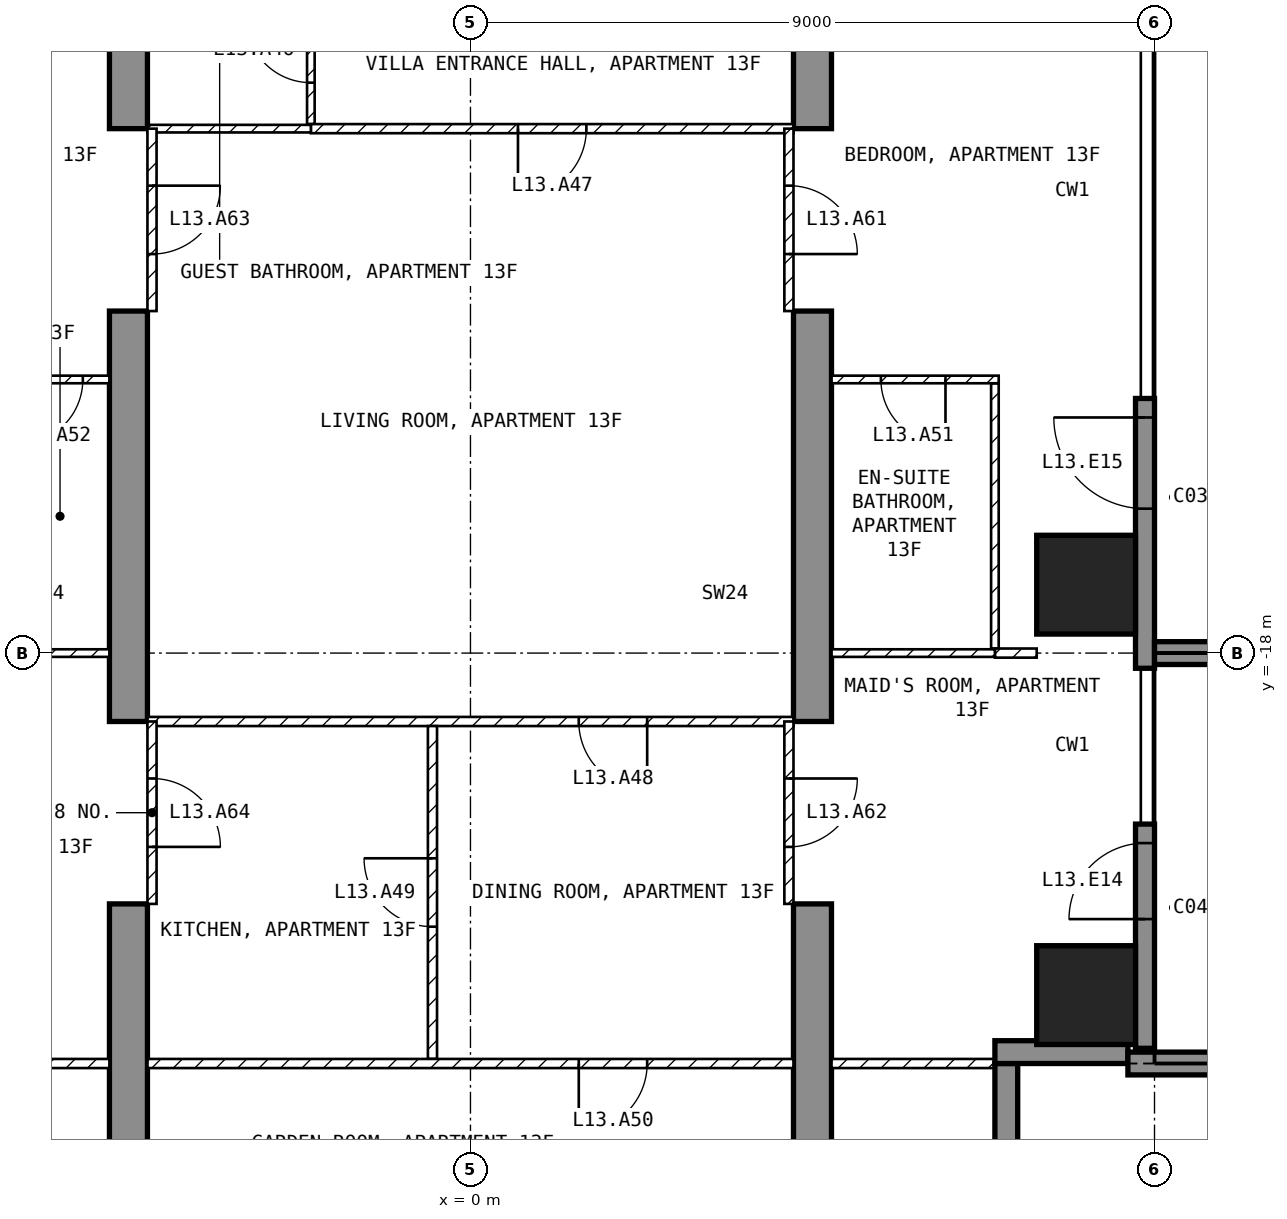
"""IFC4 building model, lengths in metres.
Left out: names, types, materials, properties, quantities, classifications, styles, units other than length and angle.
Written with IfcOpenShell. Run it as: python <this file> out.ifc"""

import sys

from ifc_helpers import new_model, si_unit, direction, frame, frame_2d, origin, origin_2d, place, context, subcontext, project, spatial, polyline, rectangle, outline, extrude, element, fill, save


model = new_model("IFC4")
c1 = context("Model", 3, precision=1e-05, world=origin(), true_north=direction((0.0, 1.0)))
c2 = subcontext(c1, "Body", "Model", "MODEL_VIEW")
j1 = project(units=[si_unit("LENGTHUNIT", "METRE"), si_unit("PLANEANGLEUNIT", "RADIAN")], contexts=[c1])
p1 = place(None, origin())
s1 = spatial("IfcSite", under=j1, at=p1, CompositionType="ELEMENT")
p2 = place(p1, origin())
s2 = spatial("IfcBuilding", under=s1, at=p2, CompositionType="ELEMENT")
p3 = place(p2, frame((0.0, 0.0, 64.5)))
s3 = spatial("IfcBuildingStorey", under=s2, at=p3, CompositionType="ELEMENT", Elevation=64.5)
for number, where, z_axis, x_axis in (
    (1, (8.1, -22.5, -0.25), (0.0, 0.0, 1.0), (1.0, 0.0, 0.0)),
    (2, (8.1, -17.1, -0.25), (0.0, 0.0, 1.0), (1.0, 0.0, 0.0)),
):
    element("IfcColumn", number, at=place(p3, frame(where, z_axis=z_axis, x_axis=x_axis)), inside=s3, PredefinedType="COLUMN", context=c2, shape_type="SweptSolid", body=[
        extrude(rectangle(XDim=1.3, YDim=1.3, at=origin_2d()), origin(), (0.0, 0.0, 1.0), 3.5),
    ])
for number, where, z_axis, x_axis in (
    (3, (-4.75, -25.45, -0.25), (1.0, 0.0, 0.0), (0.0, 1.0, 0.0)),
    (4, (4.25, -25.45, -0.25), (1.0, 0.0, 0.0), (0.0, 1.0, 0.0)),
):
    element("IfcWall", number, at=place(p3, frame(where, z_axis=z_axis, x_axis=x_axis)), inside=s3, PredefinedType="SHEAR", context=c2, shape_type="SweptSolid", body=[
        extrude(outline(polyline([(0.0, 0.0), (4.15, 0.0), (4.15, 2.65), (6.55, 2.65), (6.55, 0.0), (11.95, 0.0), (11.95, 2.65), (14.35, 2.65), (14.35, 0.0), (16.45, 0.0), (16.45, 3.5), (0.0, 3.5), (0.0, 0.0)])), origin(), (0.0, 0.0, 1.0), 0.5),
    ])
p4 = place(p3, frame((8.875, -23.2, 0.0), z_axis=(0.0, 0.0, 1.0), x_axis=(0.0, 1.0, 0.0)))
e5 = element("IfcWall", 5, at=p4, inside=s3, PredefinedType="SOLIDWALL", context=c2, shape_type="SweptSolid", body=[
    extrude(rectangle(XDim=2.95, YDim=0.25, at=frame_2d((1.475, 0.0))), origin(), (0.0, 0.0, 1.0), 3.25),
])
p5 = place(p4, frame((1.7, 0.0, 0.0)))
e6 = element("IfcOpeningElement", 6, at=p5, cuts=e5, PredefinedType="OPENING", context=c2, shape_type="SweptSolid", body=[
    extrude(rectangle(XDim=1.0, YDim=2.4, at=frame_2d((0.5, 1.2))), frame((0.0, 0.135, 0.0), z_axis=(0.0, -1.0, 0.0), x_axis=(1.0, 0.0, 0.0)), (0.0, 0.0, 1.0), 0.27),
])
p6 = place(p3, frame((8.875, -18.2, 0.0), z_axis=(0.0, 0.0, 1.0), x_axis=(0.0, 1.0, 0.0)))
e7 = element("IfcWall", 7, at=p6, inside=s3, PredefinedType="SOLIDWALL", context=c2, shape_type="SweptSolid", body=[
    extrude(rectangle(XDim=3.55, YDim=0.25, at=frame_2d((1.775, 0.0))), origin(), (0.0, 0.0, 1.0), 3.25),
])
p7 = place(p6, frame((2.1, 0.0, 0.0)))
e8 = element("IfcOpeningElement", 8, at=p7, cuts=e7, PredefinedType="OPENING", context=c2, shape_type="SweptSolid", body=[
    extrude(rectangle(XDim=1.2, YDim=2.4, at=frame_2d((0.6, 1.2))), frame((0.0, 0.135, 0.0), z_axis=(0.0, -1.0, 0.0), x_axis=(1.0, 0.0, 0.0)), (0.0, 0.0, 1.0), 0.27),
])
p8 = place(p3, frame((7.05, -25.2, 0.0), z_axis=(0.0, 0.0, 1.0), x_axis=(0.0, 1.0, 0.0)))
e9 = element("IfcWall", 9, at=p8, inside=s3, PredefinedType="SOLIDWALL", context=c2, shape_type="SweptSolid", body=[
    extrude(rectangle(XDim=1.8, YDim=0.3, at=frame_2d((0.9, 0.0))), origin(), (0.0, 0.0, 1.0), 3.25),
])
p9 = place(p3, frame((6.9, -23.25, 0.0), z_axis=(0.0, 0.0, 1.0), x_axis=(1.0, 0.0, 0.0)))
e10 = element("IfcWall", 10, at=p9, inside=s3, PredefinedType="SOLIDWALL", context=c2, shape_type="SweptSolid", body=[
    extrude(rectangle(XDim=1.75, YDim=0.3, at=frame_2d((0.875, 0.0))), origin(), (0.0, 0.0, 1.0), 3.25),
])
p10 = place(p3, frame((8.65, -23.4, 0.0), z_axis=(0.0, 0.0, 1.0), x_axis=(1.0, 0.0, 0.0)))
e11 = element("IfcWall", 11, at=p10, inside=s3, PredefinedType="SOLIDWALL", context=c2, shape_type="SweptSolid", body=[
    extrude(rectangle(XDim=3.05, YDim=0.3, at=frame_2d((1.525, 0.0))), origin(), (0.0, 0.0, 1.0), 3.25),
])
p11 = place(p3, frame((9.0, -18.0, 0.0), z_axis=(0.0, 0.0, 1.0), x_axis=(1.0, 0.0, 0.0)))
e12 = element("IfcWall", 12, at=p11, inside=s3, PredefinedType="SOLIDWALL", context=c2, shape_type="SweptSolid", body=[
    extrude(rectangle(XDim=2.7, YDim=0.3, at=frame_2d((1.35, 0.0))), origin(), (0.0, 0.0, 1.0), 3.25),
])
p12 = place(p3, frame((-2.1, -11.04, 0.0), z_axis=(0.0, 0.0, 1.0), x_axis=(0.0, 1.0, 0.0)))
e13 = element("IfcWall", 13, at=p12, inside=s3, PredefinedType="PARTITIONING", context=c2, shape_type="SweptSolid", body=[
    extrude(rectangle(XDim=1.94, YDim=0.1, at=frame_2d((0.97, 0.0))), origin(), (0.0, 0.0, 1.0), 3.25),
])
p13 = place(p12, frame((0.545, 0.0, 0.0)))
e14 = element("IfcOpeningElement", 14, at=p13, cuts=e13, PredefinedType="OPENING", context=c2, shape_type="SweptSolid", body=[
    extrude(rectangle(XDim=0.85, YDim=2.1, at=frame_2d((0.425, 1.05))), frame((0.0, 0.06, 0.0), z_axis=(0.0, -1.0, 0.0), x_axis=(1.0, 0.0, 0.0)), (0.0, 0.0, 1.0), 0.12),
])
p14 = place(p3, frame((4.25, -11.1, 0.0), z_axis=(0.0, 0.0, 1.0), x_axis=(-1.0, 0.0, 0.0)))
e15 = element("IfcWall", 15, at=p14, inside=s3, PredefinedType="PARTITIONING", context=c2, shape_type="SweptSolid", body=[
    extrude(rectangle(XDim=6.35, YDim=0.12, at=frame_2d((3.175, 0.0))), origin(), (0.0, 0.0, 1.0), 3.25),
])
p15 = place(p14, frame((2.725, 0.0, 0.0)))
e16 = element("IfcOpeningElement", 16, at=p15, cuts=e15, PredefinedType="OPENING", context=c2, shape_type="SweptSolid", body=[
    extrude(rectangle(XDim=0.9, YDim=2.1, at=frame_2d((0.45, 1.05))), frame((0.0, 0.07, 0.0), z_axis=(0.0, -1.0, 0.0), x_axis=(1.0, 0.0, 0.0)), (0.0, 0.0, 1.0), 0.14),
])
p16 = place(p3, frame((-2.1, -11.1, 0.0), z_axis=(0.0, 0.0, 1.0), x_axis=(-1.0, 0.0, 0.0)))
e17 = element("IfcWall", 17, at=p16, inside=s3, PredefinedType="PARTITIONING", context=c2, shape_type="SweptSolid", body=[
    extrude(rectangle(XDim=2.15, YDim=0.1, at=frame_2d((1.075, 0.0))), origin(), (0.0, 0.0, 1.0), 3.25),
])
p17 = place(p3, frame((4.25, -18.9, 0.0), z_axis=(0.0, 0.0, 1.0), x_axis=(-1.0, 0.0, 0.0)))
e18 = element("IfcWall", 18, at=p17, inside=s3, PredefinedType="PARTITIONING", context=c2, shape_type="SweptSolid", body=[
    extrude(rectangle(XDim=8.5, YDim=0.12, at=frame_2d((4.25, 0.0))), origin(), (0.0, 0.0, 1.0), 3.25),
])
p18 = place(p17, frame((1.925, 0.0, 0.0)))
e19 = element("IfcOpeningElement", 19, at=p18, cuts=e18, PredefinedType="OPENING", context=c2, shape_type="SweptSolid", body=[
    extrude(rectangle(XDim=0.9, YDim=2.1, at=frame_2d((0.45, 1.05))), frame((0.0, 0.07, 0.0), z_axis=(0.0, -1.0, 0.0), x_axis=(1.0, 0.0, 0.0)), (0.0, 0.0, 1.0), 0.14),
])
p19 = place(p3, frame((-0.5, -23.34, 0.0), z_axis=(0.0, 0.0, 1.0), x_axis=(0.0, 1.0, 0.0)))
e20 = element("IfcWall", 20, at=p19, inside=s3, PredefinedType="PARTITIONING", context=c2, shape_type="SweptSolid", body=[
    extrude(rectangle(XDim=4.38, YDim=0.12, at=frame_2d((2.19, 0.0))), origin(), (0.0, 0.0, 1.0), 3.25),
])
p20 = place(p19, frame((1.74, 0.0, 0.0)))
e21 = element("IfcOpeningElement", 21, at=p20, cuts=e20, PredefinedType="OPENING", context=c2, shape_type="SweptSolid", body=[
    extrude(rectangle(XDim=0.9, YDim=2.1, at=frame_2d((0.45, 1.05))), frame((0.0, 0.07, 0.0), z_axis=(0.0, -1.0, 0.0), x_axis=(1.0, 0.0, 0.0)), (0.0, 0.0, 1.0), 0.14),
])
p21 = place(p3, frame((4.25, -23.4, 0.0), z_axis=(0.0, 0.0, 1.0), x_axis=(-1.0, 0.0, 0.0)))
e22 = element("IfcWall", 22, at=p21, inside=s3, PredefinedType="PARTITIONING", context=c2, shape_type="SweptSolid", body=[
    extrude(rectangle(XDim=8.5, YDim=0.12, at=frame_2d((4.25, 0.0))), origin(), (0.0, 0.0, 1.0), 3.25),
])
p22 = place(p21, frame((1.925, 0.0, 0.0)))
e23 = element("IfcOpeningElement", 23, at=p22, cuts=e22, PredefinedType="OPENING", context=c2, shape_type="SweptSolid", body=[
    extrude(rectangle(XDim=0.9, YDim=2.1, at=frame_2d((0.45, 1.05))), frame((0.0, 0.07, 0.0), z_axis=(0.0, -1.0, 0.0), x_axis=(1.0, 0.0, 0.0)), (0.0, 0.0, 1.0), 0.14),
])
p23 = place(p3, frame((6.9, -17.94, 0.0), z_axis=(0.0, 0.0, 1.0), x_axis=(0.0, 1.0, 0.0)))
e24 = element("IfcWall", 24, at=p23, inside=s3, PredefinedType="PARTITIONING", context=c2, shape_type="SweptSolid", body=[
    extrude(rectangle(XDim=3.49, YDim=0.1, at=frame_2d((1.745, 0.0))), origin(), (0.0, 0.0, 1.0), 3.25),
])
p24 = place(p3, frame((6.95, -14.4, 0.0), z_axis=(0.0, 0.0, 1.0), x_axis=(-1.0, 0.0, 0.0)))
e25 = element("IfcWall", 25, at=p24, inside=s3, PredefinedType="PARTITIONING", context=c2, shape_type="SweptSolid", body=[
    extrude(rectangle(XDim=2.2, YDim=0.1, at=frame_2d((1.1, 0.0))), origin(), (0.0, 0.0, 1.0), 3.25),
])
p25 = place(p24, frame((0.7, 0.0, 0.0)))
e26 = element("IfcOpeningElement", 26, at=p25, cuts=e25, PredefinedType="OPENING", context=c2, shape_type="SweptSolid", body=[
    extrude(rectangle(XDim=0.85, YDim=2.1, at=frame_2d((0.425, 1.05))), frame((0.0, 0.06, 0.0), z_axis=(0.0, -1.0, 0.0), x_axis=(1.0, 0.0, 0.0)), (0.0, 0.0, 1.0), 0.12),
])
p26 = place(p3, frame((7.45, -18.0, 0.0), z_axis=(0.0, 0.0, 1.0), x_axis=(-1.0, 0.0, 0.0)))
e27 = element("IfcWall", 27, at=p26, inside=s3, PredefinedType="PARTITIONING", context=c2, shape_type="SweptSolid", body=[
    extrude(rectangle(XDim=0.55, YDim=0.12, at=frame_2d((0.275, 0.0))), origin(), (0.0, 0.0, 1.0), 3.25),
])
p27 = place(p3, frame((6.9, -18.0, 0.0), z_axis=(0.0, 0.0, 1.0), x_axis=(-1.0, 0.0, 0.0)))
e28 = element("IfcWall", 28, at=p27, inside=s3, PredefinedType="PARTITIONING", context=c2, shape_type="SweptSolid", body=[
    extrude(rectangle(XDim=2.15, YDim=0.1, at=frame_2d((1.075, 0.0))), origin(), (0.0, 0.0, 1.0), 3.25),
])
p28 = place(p3, frame((7.12, -23.4, 0.0), z_axis=(0.0, 0.0, 1.0), x_axis=(-1.0, 0.0, 0.0)))
e29 = element("IfcWall", 29, at=p28, inside=s3, PredefinedType="PARTITIONING", context=c2, shape_type="SweptSolid", body=[
    extrude(rectangle(XDim=2.37, YDim=0.12, at=frame_2d((1.185, 0.0))), origin(), (0.0, 0.0, 1.0), 3.25),
])
p29 = place(p3, frame((-4.75, -14.4, 0.0), z_axis=(0.0, 0.0, 1.0), x_axis=(-1.0, 0.0, 0.0)))
e30 = element("IfcWall", 30, at=p29, inside=s3, PredefinedType="PARTITIONING", context=c2, shape_type="SweptSolid", body=[
    extrude(rectangle(XDim=1.6, YDim=0.1, at=frame_2d((0.8, 0.0))), origin(), (0.0, 0.0, 1.0), 3.25),
])
p30 = place(p29, frame((0.35, 0.0, 0.0)))
e31 = element("IfcOpeningElement", 31, at=p30, cuts=e30, PredefinedType="OPENING", context=c2, shape_type="SweptSolid", body=[
    extrude(rectangle(XDim=0.85, YDim=2.1, at=frame_2d((0.425, 1.05))), frame((0.0, 0.06, 0.0), z_axis=(0.0, -1.0, 0.0), x_axis=(1.0, 0.0, 0.0)), (0.0, 0.0, 1.0), 0.12),
])
p31 = place(p3, frame((-4.75, -18.0, 0.0), z_axis=(0.0, 0.0, 1.0), x_axis=(-1.0, 0.0, 0.0)))
e32 = element("IfcWall", 32, at=p31, inside=s3, PredefinedType="PARTITIONING", context=c2, shape_type="SweptSolid", body=[
    extrude(rectangle(XDim=1.55, YDim=0.1, at=frame_2d((0.775, 0.0))), origin(), (0.0, 0.0, 1.0), 3.25),
])
p32 = place(p3, frame((-4.75, -23.4, 0.0), z_axis=(0.0, 0.0, 1.0), x_axis=(-1.0, 0.0, 0.0)))
e33 = element("IfcWall", 33, at=p32, inside=s3, PredefinedType="PARTITIONING", context=c2, shape_type="SweptSolid", body=[
    extrude(rectangle(XDim=2.37, YDim=0.12, at=frame_2d((1.185, 0.0))), origin(), (0.0, 0.0, 1.0), 3.25),
])
p33 = place(p3, frame((4.19, -11.1, 0.0), z_axis=(0.0, 0.0, 1.0), x_axis=(0.0, -1.0, 0.0)))
e34 = element("IfcWall", 34, at=p33, inside=s3, PredefinedType="PARTITIONING", context=c2, shape_type="SweptSolid", body=[
    extrude(rectangle(XDim=2.4, YDim=0.12, at=frame_2d((1.2, 0.0))), origin(), (0.0, 0.0, 1.0), 2.4),
])
p34 = place(p33, frame((0.75, 0.0, 0.0)))
e35 = element("IfcOpeningElement", 35, at=p34, cuts=e34, PredefinedType="OPENING", context=c2, shape_type="SweptSolid", body=[
    extrude(rectangle(XDim=0.9, YDim=2.1, at=frame_2d((0.45, 1.05))), frame((0.0, 0.07, 0.0), z_axis=(0.0, -1.0, 0.0), x_axis=(1.0, 0.0, 0.0)), (0.0, 0.0, 1.0), 0.14),
])
p35 = place(p3, frame((4.19, -18.9, 0.0), z_axis=(0.0, 0.0, 1.0), x_axis=(0.0, -1.0, 0.0)))
e36 = element("IfcWall", 36, at=p35, inside=s3, PredefinedType="PARTITIONING", context=c2, shape_type="SweptSolid", body=[
    extrude(rectangle(XDim=2.4, YDim=0.12, at=frame_2d((1.2, 0.0))), origin(), (0.0, 0.0, 1.0), 2.4),
])
p36 = place(p35, frame((0.75, 0.0, 0.0)))
e37 = element("IfcOpeningElement", 37, at=p36, cuts=e36, PredefinedType="OPENING", context=c2, shape_type="SweptSolid", body=[
    extrude(rectangle(XDim=0.9, YDim=2.1, at=frame_2d((0.45, 1.05))), frame((0.0, 0.07, 0.0), z_axis=(0.0, -1.0, 0.0), x_axis=(1.0, 0.0, 0.0)), (0.0, 0.0, 1.0), 0.14),
])
p37 = place(p3, frame((-4.19, -11.1, 0.0), z_axis=(0.0, 0.0, 1.0), x_axis=(0.0, -1.0, 0.0)))
e38 = element("IfcWall", 38, at=p37, inside=s3, PredefinedType="PARTITIONING", context=c2, shape_type="SweptSolid", body=[
    extrude(rectangle(XDim=2.4, YDim=0.12, at=frame_2d((1.2, 0.0))), origin(), (0.0, 0.0, 1.0), 2.4),
])
p38 = place(p37, frame((0.75, 0.0, 0.0)))
e39 = element("IfcOpeningElement", 39, at=p38, cuts=e38, PredefinedType="OPENING", context=c2, shape_type="SweptSolid", body=[
    extrude(rectangle(XDim=0.9, YDim=2.1, at=frame_2d((0.45, 1.05))), frame((0.0, 0.07, 0.0), z_axis=(0.0, -1.0, 0.0), x_axis=(1.0, 0.0, 0.0)), (0.0, 0.0, 1.0), 0.14),
])
p39 = place(p3, frame((-4.19, -18.9, 0.0), z_axis=(0.0, 0.0, 1.0), x_axis=(0.0, -1.0, 0.0)))
e40 = element("IfcWall", 40, at=p39, inside=s3, PredefinedType="PARTITIONING", context=c2, shape_type="SweptSolid", body=[
    extrude(rectangle(XDim=2.4, YDim=0.12, at=frame_2d((1.2, 0.0))), origin(), (0.0, 0.0, 1.0), 2.4),
])
p40 = place(p39, frame((0.75, 0.0, 0.0)))
e41 = element("IfcOpeningElement", 41, at=p40, cuts=e40, PredefinedType="OPENING", context=c2, shape_type="SweptSolid", body=[
    extrude(rectangle(XDim=0.9, YDim=2.1, at=frame_2d((0.45, 1.05))), frame((0.0, 0.07, 0.0), z_axis=(0.0, -1.0, 0.0), x_axis=(1.0, 0.0, 0.0)), (0.0, 0.0, 1.0), 0.14),
])
p41 = place(p5, origin())
e42 = element("IfcDoor", 42, at=p41, inside=s3, OperationType="SINGLE_SWING_LEFT", PredefinedType="DOOR", context=c2, shape_type="SweptSolid", body=[
    extrude(rectangle(XDim=1.0, YDim=2.4, at=frame_2d((0.5, 1.2))), frame((0.0, 0.025, 0.0), z_axis=(0.0, -1.0, 0.0), x_axis=(1.0, 0.0, 0.0)), (0.0, 0.0, 1.0), 0.05),
])
fill(e6, e42)
p42 = place(p7, origin())
e43 = element("IfcDoor", 43, at=p42, inside=s3, OperationType="SINGLE_SWING_RIGHT", PredefinedType="DOOR", context=c2, shape_type="SweptSolid", body=[
    extrude(rectangle(XDim=1.2, YDim=2.4, at=frame_2d((0.6, 1.2))), frame((0.0, 0.025, 0.0), z_axis=(0.0, -1.0, 0.0), x_axis=(1.0, 0.0, 0.0)), (0.0, 0.0, 1.0), 0.05),
])
fill(e8, e43)
p43 = place(p13, origin())
e44 = element("IfcDoor", 44, at=p43, inside=s3, OperationType="SINGLE_SWING_RIGHT", PredefinedType="DOOR", context=c2, shape_type="SweptSolid", body=[
    extrude(rectangle(XDim=0.85, YDim=2.1, at=frame_2d((0.425, 1.05))), frame((0.0, 0.025, 0.0), z_axis=(0.0, -1.0, 0.0), x_axis=(1.0, 0.0, 0.0)), (0.0, 0.0, 1.0), 0.05),
])
fill(e14, e44)
p44 = place(p15, origin())
e45 = element("IfcDoor", 45, at=p44, inside=s3, OperationType="SINGLE_SWING_RIGHT", PredefinedType="DOOR", context=c2, shape_type="SweptSolid", body=[
    extrude(rectangle(XDim=0.9, YDim=2.1, at=frame_2d((0.45, 1.05))), frame((0.0, 0.025, 0.0), z_axis=(0.0, -1.0, 0.0), x_axis=(1.0, 0.0, 0.0)), (0.0, 0.0, 1.0), 0.05),
])
fill(e16, e45)
p45 = place(p18, origin())
e46 = element("IfcDoor", 46, at=p45, inside=s3, OperationType="SINGLE_SWING_LEFT", PredefinedType="DOOR", context=c2, shape_type="SweptSolid", body=[
    extrude(rectangle(XDim=0.9, YDim=2.1, at=frame_2d((0.45, 1.05))), frame((0.0, 0.025, 0.0), z_axis=(0.0, -1.0, 0.0), x_axis=(1.0, 0.0, 0.0)), (0.0, 0.0, 1.0), 0.05),
])
fill(e19, e46)
p46 = place(p20, origin())
e47 = element("IfcDoor", 47, at=p46, inside=s3, OperationType="SINGLE_SWING_RIGHT", PredefinedType="DOOR", context=c2, shape_type="SweptSolid", body=[
    extrude(rectangle(XDim=0.9, YDim=2.1, at=frame_2d((0.45, 1.05))), frame((0.0, 0.025, 0.0), z_axis=(0.0, -1.0, 0.0), x_axis=(1.0, 0.0, 0.0)), (0.0, 0.0, 1.0), 0.05),
])
fill(e21, e47)
p47 = place(p22, origin())
e48 = element("IfcDoor", 48, at=p47, inside=s3, OperationType="SINGLE_SWING_RIGHT", PredefinedType="DOOR", context=c2, shape_type="SweptSolid", body=[
    extrude(rectangle(XDim=0.9, YDim=2.1, at=frame_2d((0.45, 1.05))), frame((0.0, 0.025, 0.0), z_axis=(0.0, -1.0, 0.0), x_axis=(1.0, 0.0, 0.0)), (0.0, 0.0, 1.0), 0.05),
])
fill(e23, e48)
p48 = place(p25, origin())
e49 = element("IfcDoor", 49, at=p48, inside=s3, OperationType="SINGLE_SWING_LEFT", PredefinedType="DOOR", context=c2, shape_type="SweptSolid", body=[
    extrude(rectangle(XDim=0.85, YDim=2.1, at=frame_2d((0.425, 1.05))), frame((0.0, 0.025, 0.0), z_axis=(0.0, -1.0, 0.0), x_axis=(1.0, 0.0, 0.0)), (0.0, 0.0, 1.0), 0.05),
])
fill(e26, e49)
p49 = place(p30, origin())
e50 = element("IfcDoor", 50, at=p49, inside=s3, OperationType="SINGLE_SWING_RIGHT", PredefinedType="DOOR", context=c2, shape_type="SweptSolid", body=[
    extrude(rectangle(XDim=0.85, YDim=2.1, at=frame_2d((0.425, 1.05))), frame((0.0, 0.025, 0.0), z_axis=(0.0, -1.0, 0.0), x_axis=(1.0, 0.0, 0.0)), (0.0, 0.0, 1.0), 0.05),
])
fill(e31, e50)
p50 = place(p34, origin())
e51 = element("IfcDoor", 51, at=p50, inside=s3, OperationType="SINGLE_SWING_RIGHT", PredefinedType="DOOR", context=c2, shape_type="SweptSolid", body=[
    extrude(rectangle(XDim=0.9, YDim=2.1, at=frame_2d((0.45, 1.05))), frame((0.0, 0.025, 0.0), z_axis=(0.0, -1.0, 0.0), x_axis=(1.0, 0.0, 0.0)), (0.0, 0.0, 1.0), 0.05),
])
fill(e35, e51)
p51 = place(p36, origin())
e52 = element("IfcDoor", 52, at=p51, inside=s3, OperationType="SINGLE_SWING_LEFT", PredefinedType="DOOR", context=c2, shape_type="SweptSolid", body=[
    extrude(rectangle(XDim=0.9, YDim=2.1, at=frame_2d((0.45, 1.05))), frame((0.0, 0.025, 0.0), z_axis=(0.0, -1.0, 0.0), x_axis=(1.0, 0.0, 0.0)), (0.0, 0.0, 1.0), 0.05),
])
fill(e37, e52)
p52 = place(p38, origin())
e53 = element("IfcDoor", 53, at=p52, inside=s3, OperationType="SINGLE_SWING_LEFT", PredefinedType="DOOR", context=c2, shape_type="SweptSolid", body=[
    extrude(rectangle(XDim=0.9, YDim=2.1, at=frame_2d((0.45, 1.05))), frame((0.0, 0.025, 0.0), z_axis=(0.0, -1.0, 0.0), x_axis=(1.0, 0.0, 0.0)), (0.0, 0.0, 1.0), 0.05),
])
fill(e39, e53)
p53 = place(p40, origin())
e54 = element("IfcDoor", 54, at=p53, inside=s3, OperationType="SINGLE_SWING_RIGHT", PredefinedType="DOOR", context=c2, shape_type="SweptSolid", body=[
    extrude(rectangle(XDim=0.9, YDim=2.1, at=frame_2d((0.45, 1.05))), frame((0.0, 0.025, 0.0), z_axis=(0.0, -1.0, 0.0), x_axis=(1.0, 0.0, 0.0)), (0.0, 0.0, 1.0), 0.05),
])
fill(e41, e54)
save(model, sys.argv[1])
